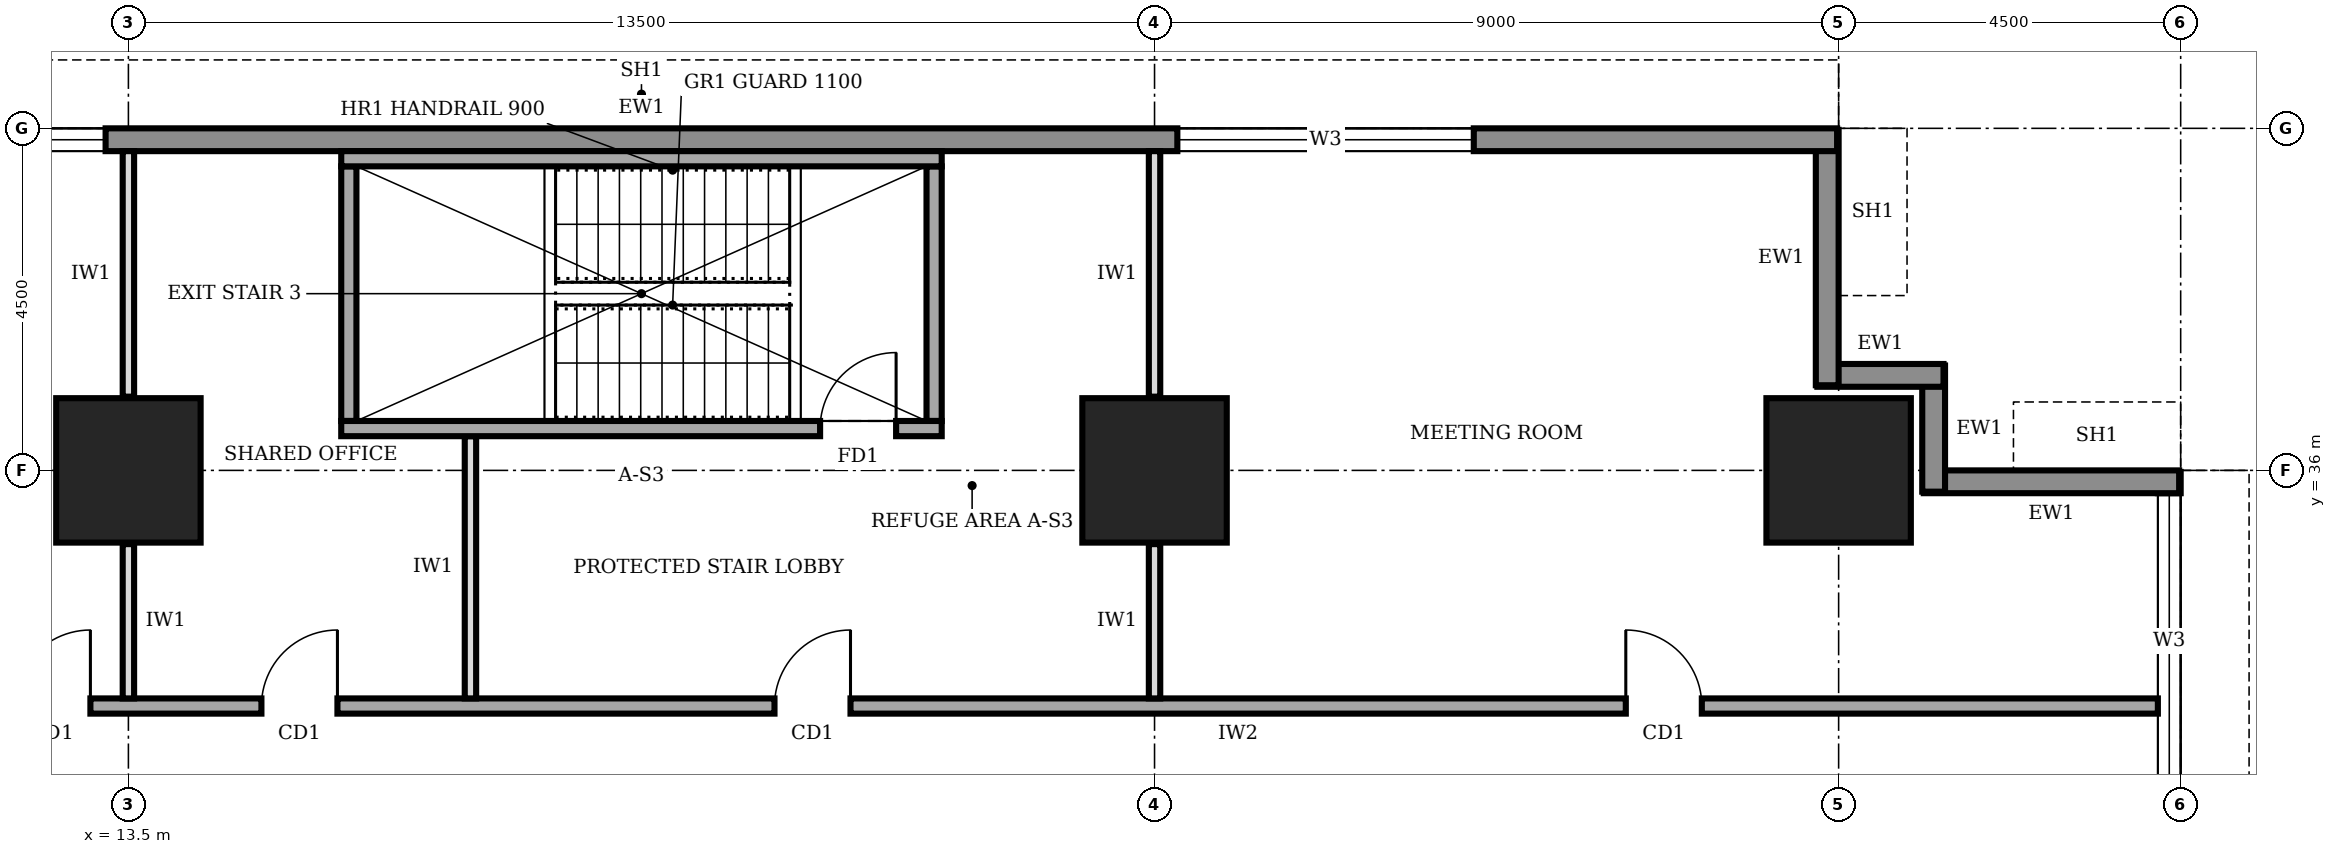
"""IFC4 building model, lengths in metres.
Left out: names, types, materials, properties, quantities, classifications, styles, units other than length and angle.
Written with IfcOpenShell. Run it as: python <this file> out.ifc"""

import sys

from ifc_helpers import new_model, si_unit, direction, frame, frame_2d, origin, origin_2d, place, context, subcontext, project, spatial, rectangle, extrude, element, fill, save


model = new_model("IFC4")
c1 = context("Model", 3, precision=1e-05, world=origin(), true_north=direction((0.0, 1.0)))
c2 = subcontext(c1, "Body", "Model", "MODEL_VIEW")
j1 = project(units=[si_unit("LENGTHUNIT", "METRE"), si_unit("PLANEANGLEUNIT", "RADIAN")], contexts=[c1])
p1 = place(None, origin())
s1 = spatial("IfcSite", under=j1, at=p1, CompositionType="ELEMENT")
p2 = place(p1, origin())
s2 = spatial("IfcBuilding", under=s1, at=p2, CompositionType="ELEMENT")
p3 = place(p2, frame((0.0, 0.0, 93.0)))
s3 = spatial("IfcBuildingStorey", under=s2, at=p3, CompositionType="ELEMENT", Elevation=93.0)
for number, where, z_axis, x_axis in (
    (1, (13.5, 36.0, 0.0), (0.0, 0.0, 1.0), (1.0, 0.0, 0.0)),
    (2, (27.0, 36.0, 0.0), (0.0, 0.0, 1.0), (1.0, 0.0, 0.0)),
    (3, (36.0, 36.0, 0.0), (0.0, 0.0, 1.0), (1.0, 0.0, 0.0)),
):
    element("IfcColumn", number, at=place(p3, frame(where, z_axis=z_axis, x_axis=x_axis)), inside=s3, PredefinedType="COLUMN", context=c2, shape_type="SweptSolid", body=[
        extrude(rectangle(XDim=1.9, YDim=1.9, at=origin_2d()), origin(), (0.0, 0.0, 1.0), 4.0),
    ])
p4 = place(p3, frame((40.35, 4.52, 0.0), z_axis=(0.0, 0.0, 1.0), x_axis=(0.0, 1.0, 0.0)))
e4 = element("IfcWall", 4, at=p4, inside=s3, PredefinedType="STANDARD", context=c2, shape_type="SweptSolid", body=[
    extrude(rectangle(XDim=31.46, YDim=0.3, at=frame_2d((15.73, 0.0))), origin(), (0.0, 0.0, 1.0), 3.75),
])
p5 = place(p4, frame((4.78, 0.0, 0.95)))
e5 = element("IfcOpeningElement", 5, at=p5, cuts=e4, PredefinedType="OPENING", context=c2, shape_type="SweptSolid", body=[
    extrude(rectangle(XDim=3.9, YDim=1.8, at=frame_2d((1.95, 0.9))), frame((0.0, 0.16, 0.0), z_axis=(0.0, -1.0, 0.0), x_axis=(1.0, 0.0, 0.0)), (0.0, 0.0, 1.0), 0.32),
])
p6 = place(p4, frame((9.28, 0.0, 0.95)))
e6 = element("IfcOpeningElement", 6, at=p6, cuts=e4, PredefinedType="OPENING", context=c2, shape_type="SweptSolid", body=[
    extrude(rectangle(XDim=3.9, YDim=1.8, at=frame_2d((1.95, 0.9))), frame((0.0, 0.16, 0.0), z_axis=(0.0, -1.0, 0.0), x_axis=(1.0, 0.0, 0.0)), (0.0, 0.0, 1.0), 0.32),
])
p7 = place(p4, frame((13.78, 0.0, 0.95)))
e7 = element("IfcOpeningElement", 7, at=p7, cuts=e4, PredefinedType="OPENING", context=c2, shape_type="SweptSolid", body=[
    extrude(rectangle(XDim=3.9, YDim=1.8, at=frame_2d((1.95, 0.9))), frame((0.0, 0.16, 0.0), z_axis=(0.0, -1.0, 0.0), x_axis=(1.0, 0.0, 0.0)), (0.0, 0.0, 1.0), 0.32),
])
p8 = place(p4, frame((18.28, 0.0, 0.95)))
e8 = element("IfcOpeningElement", 8, at=p8, cuts=e4, PredefinedType="OPENING", context=c2, shape_type="SweptSolid", body=[
    extrude(rectangle(XDim=3.9, YDim=1.8, at=frame_2d((1.95, 0.9))), frame((0.0, 0.16, 0.0), z_axis=(0.0, -1.0, 0.0), x_axis=(1.0, 0.0, 0.0)), (0.0, 0.0, 1.0), 0.32),
])
p9 = place(p4, frame((22.78, 0.0, 0.95)))
e9 = element("IfcOpeningElement", 9, at=p9, cuts=e4, PredefinedType="OPENING", context=c2, shape_type="SweptSolid", body=[
    extrude(rectangle(XDim=3.9, YDim=1.8, at=frame_2d((1.95, 0.9))), frame((0.0, 0.16, 0.0), z_axis=(0.0, -1.0, 0.0), x_axis=(1.0, 0.0, 0.0)), (0.0, 0.0, 1.0), 0.32),
])
p10 = place(p4, frame((27.28, 0.0, 0.95)))
e10 = element("IfcOpeningElement", 10, at=p10, cuts=e4, PredefinedType="OPENING", context=c2, shape_type="SweptSolid", body=[
    extrude(rectangle(XDim=3.9, YDim=1.8, at=frame_2d((1.95, 0.9))), frame((0.0, 0.16, 0.0), z_axis=(0.0, -1.0, 0.0), x_axis=(1.0, 0.0, 0.0)), (0.0, 0.0, 1.0), 0.32),
])
p11 = place(p3, frame((40.48, 35.85, 0.0), z_axis=(0.0, 0.0, 1.0), x_axis=(-1.0, 0.0, 0.0)))
e11 = element("IfcWall", 11, at=p11, inside=s3, PredefinedType="STANDARD", context=c2, shape_type="SweptSolid", body=[
    extrude(rectangle(XDim=3.36, YDim=0.3, at=frame_2d((1.68, 0.0))), origin(), (0.0, 0.0, 1.0), 2.85),
])
for number, where, z_axis, x_axis in (
    (12, (37.25, 35.72, 0.0), (0.0, 0.0, 1.0), (0.0, 1.0, 0.0)),
    (13, (37.38, 37.25, 0.0), (0.0, 0.0, 1.0), (-1.0, 0.0, 0.0)),
):
    element("IfcWall", number, at=place(p3, frame(where, z_axis=z_axis, x_axis=x_axis)), inside=s3, PredefinedType="STANDARD", context=c2, shape_type="SweptSolid", body=[
        extrude(rectangle(XDim=1.66, YDim=0.3, at=frame_2d((0.83, 0.0))), origin(), (0.0, 0.0, 1.0), 3.75),
    ])
p12 = place(p3, frame((35.85, 37.12, 0.0), z_axis=(0.0, 0.0, 1.0), x_axis=(0.0, 1.0, 0.0)))
e14 = element("IfcWall", 14, at=p12, inside=s3, PredefinedType="STANDARD", context=c2, shape_type="SweptSolid", body=[
    extrude(rectangle(XDim=3.36, YDim=0.3, at=frame_2d((1.68, 0.0))), origin(), (0.0, 0.0, 1.0), 2.85),
])
p13 = place(p3, frame((35.98, 40.35, 0.0), z_axis=(0.0, 0.0, 1.0), x_axis=(-1.0, 0.0, 0.0)))
e15 = element("IfcWall", 15, at=p13, inside=s3, PredefinedType="STANDARD", context=c2, shape_type="SweptSolid", body=[
    extrude(rectangle(XDim=31.46, YDim=0.3, at=frame_2d((15.73, 0.0))), origin(), (0.0, 0.0, 1.0), 3.75),
])
p14 = place(p13, frame((27.28, 0.0, 0.95)))
e16 = element("IfcOpeningElement", 16, at=p14, cuts=e15, PredefinedType="OPENING", context=c2, shape_type="SweptSolid", body=[
    extrude(rectangle(XDim=3.9, YDim=1.8, at=frame_2d((1.95, 0.9))), frame((0.0, 0.16, 0.0), z_axis=(0.0, -1.0, 0.0), x_axis=(1.0, 0.0, 0.0)), (0.0, 0.0, 1.0), 0.32),
])
p15 = place(p13, frame((22.78, 0.0, 0.95)))
e17 = element("IfcOpeningElement", 17, at=p15, cuts=e15, PredefinedType="OPENING", context=c2, shape_type="SweptSolid", body=[
    extrude(rectangle(XDim=3.9, YDim=1.8, at=frame_2d((1.95, 0.9))), frame((0.0, 0.16, 0.0), z_axis=(0.0, -1.0, 0.0), x_axis=(1.0, 0.0, 0.0)), (0.0, 0.0, 1.0), 0.32),
])
p16 = place(p13, frame((4.78, 0.0, 0.95)))
e18 = element("IfcOpeningElement", 18, at=p16, cuts=e15, PredefinedType="OPENING", context=c2, shape_type="SweptSolid", body=[
    extrude(rectangle(XDim=3.9, YDim=1.8, at=frame_2d((1.95, 0.9))), frame((0.0, 0.16, 0.0), z_axis=(0.0, -1.0, 0.0), x_axis=(1.0, 0.0, 0.0)), (0.0, 0.0, 1.0), 0.32),
])
p17 = place(p3, frame((40.2, 32.9, 0.0), z_axis=(0.0, 0.0, 1.0), x_axis=(-1.0, 0.0, 0.0)))
e19 = element("IfcWall", 19, at=p17, inside=s3, PredefinedType="SOLIDWALL", context=c2, shape_type="SweptSolid", body=[
    extrude(rectangle(XDim=28.5, YDim=0.2, at=frame_2d((14.25, 0.0))), origin(), (0.0, 0.0, 1.0), 3.75),
])
p18 = place(p17, frame((27.2, 0.0, 0.0)))
e20 = element("IfcOpeningElement", 20, at=p18, cuts=e19, PredefinedType="OPENING", context=c2, shape_type="SweptSolid", body=[
    extrude(rectangle(XDim=1.0, YDim=2.1, at=frame_2d((0.5, 1.05))), frame((0.0, 0.11, 0.0), z_axis=(0.0, -1.0, 0.0), x_axis=(1.0, 0.0, 0.0)), (0.0, 0.0, 1.0), 0.22),
])
p19 = place(p17, frame((23.95, 0.0, 0.0)))
e21 = element("IfcOpeningElement", 21, at=p19, cuts=e19, PredefinedType="OPENING", context=c2, shape_type="SweptSolid", body=[
    extrude(rectangle(XDim=1.0, YDim=2.1, at=frame_2d((0.5, 1.05))), frame((0.0, 0.11, 0.0), z_axis=(0.0, -1.0, 0.0), x_axis=(1.0, 0.0, 0.0)), (0.0, 0.0, 1.0), 0.22),
])
p20 = place(p17, frame((17.2, 0.0, 0.0)))
e22 = element("IfcOpeningElement", 22, at=p20, cuts=e19, PredefinedType="OPENING", context=c2, shape_type="SweptSolid", body=[
    extrude(rectangle(XDim=1.0, YDim=2.1, at=frame_2d((0.5, 1.05))), frame((0.0, 0.11, 0.0), z_axis=(0.0, -1.0, 0.0), x_axis=(1.0, 0.0, 0.0)), (0.0, 0.0, 1.0), 0.22),
])
p21 = place(p17, frame((6.0, 0.0, 0.0)))
e23 = element("IfcOpeningElement", 23, at=p21, cuts=e19, PredefinedType="OPENING", context=c2, shape_type="SweptSolid", body=[
    extrude(rectangle(XDim=1.0, YDim=2.1, at=frame_2d((0.5, 1.05))), frame((0.0, 0.11, 0.0), z_axis=(0.0, -1.0, 0.0), x_axis=(1.0, 0.0, 0.0)), (0.0, 0.0, 1.0), 0.22),
])
p22 = place(p3, frame((13.5, 33.0, 0.0), z_axis=(0.0, 0.0, 1.0), x_axis=(0.0, 1.0, 0.0)))
e24 = element("IfcWall", 24, at=p22, inside=s3, PredefinedType="PARTITIONING", context=c2, shape_type="SweptSolid", body=[
    extrude(rectangle(XDim=2.03, YDim=0.15, at=frame_2d((1.015, 0.0))), origin(), (0.0, 0.0, 1.0), 2.85),
])
p23 = place(p3, frame((13.5, 36.97, 0.0), z_axis=(0.0, 0.0, 1.0), x_axis=(0.0, 1.0, 0.0)))
e25 = element("IfcWall", 25, at=p23, inside=s3, PredefinedType="PARTITIONING", context=c2, shape_type="SweptSolid", body=[
    extrude(rectangle(XDim=3.23, YDim=0.15, at=frame_2d((1.615, 0.0))), origin(), (0.0, 0.0, 1.0), 2.85),
])
p24 = place(p3, frame((18.0, 33.0, 0.0), z_axis=(0.0, 0.0, 1.0), x_axis=(0.0, 1.0, 0.0)))
e26 = element("IfcWall", 26, at=p24, inside=s3, PredefinedType="PARTITIONING", context=c2, shape_type="SweptSolid", body=[
    extrude(rectangle(XDim=3.45, YDim=0.15, at=frame_2d((1.725, 0.0))), origin(), (0.0, 0.0, 1.0), 3.75),
])
p25 = place(p3, frame((27.0, 33.0, 0.0), z_axis=(0.0, 0.0, 1.0), x_axis=(0.0, 1.0, 0.0)))
e27 = element("IfcWall", 27, at=p25, inside=s3, PredefinedType="PARTITIONING", context=c2, shape_type="SweptSolid", body=[
    extrude(rectangle(XDim=2.03, YDim=0.15, at=frame_2d((1.015, 0.0))), origin(), (0.0, 0.0, 1.0), 2.85),
])
p26 = place(p3, frame((27.0, 36.97, 0.0), z_axis=(0.0, 0.0, 1.0), x_axis=(0.0, 1.0, 0.0)))
e28 = element("IfcWall", 28, at=p26, inside=s3, PredefinedType="PARTITIONING", context=c2, shape_type="SweptSolid", body=[
    extrude(rectangle(XDim=3.23, YDim=0.15, at=frame_2d((1.615, 0.0))), origin(), (0.0, 0.0, 1.0), 2.85),
])
p27 = place(p3, frame((16.3, 36.55, 0.0), z_axis=(0.0, 0.0, 1.0), x_axis=(1.0, 0.0, 0.0)))
e29 = element("IfcWall", 29, at=p27, inside=s3, PredefinedType="SOLIDWALL", context=c2, shape_type="SweptSolid", body=[
    extrude(rectangle(XDim=7.9, YDim=0.2, at=frame_2d((3.95, 0.0))), origin(), (0.0, 0.0, 1.0), 3.75),
])
p28 = place(p27, frame((6.3, 0.0, 0.0)))
e30 = element("IfcOpeningElement", 30, at=p28, cuts=e29, PredefinedType="OPENING", context=c2, shape_type="SweptSolid", body=[
    extrude(rectangle(XDim=1.0, YDim=2.1, at=frame_2d((0.5, 1.05))), frame((0.0, 0.11, 0.0), z_axis=(0.0, -1.0, 0.0), x_axis=(1.0, 0.0, 0.0)), (0.0, 0.0, 1.0), 0.22),
])
p29 = place(p3, frame((16.3, 40.1, 0.0), z_axis=(0.0, 0.0, 1.0), x_axis=(1.0, 0.0, 0.0)))
e31 = element("IfcWall", 31, at=p29, inside=s3, PredefinedType="SOLIDWALL", context=c2, shape_type="SweptSolid", body=[
    extrude(rectangle(XDim=7.9, YDim=0.2, at=frame_2d((3.95, 0.0))), origin(), (0.0, 0.0, 1.0), 3.75),
])
for number, where, z_axis, x_axis in (
    (32, (16.4, 36.65, 0.0), (0.0, 0.0, 1.0), (0.0, 1.0, 0.0)),
    (33, (24.1, 36.65, 0.0), (0.0, 0.0, 1.0), (0.0, 1.0, 0.0)),
):
    element("IfcWall", number, at=place(p3, frame(where, z_axis=z_axis, x_axis=x_axis)), inside=s3, PredefinedType="SOLIDWALL", context=c2, shape_type="SweptSolid", body=[
        extrude(rectangle(XDim=3.35, YDim=0.2, at=frame_2d((1.675, 0.0))), origin(), (0.0, 0.0, 1.0), 3.75),
    ])
p30 = place(p10, origin())
e34 = element("IfcWindow", 34, at=p30, inside=s3, PartitioningType="SINGLE_PANEL", PredefinedType="WINDOW", context=c2, shape_type="SweptSolid", body=[
    extrude(rectangle(XDim=3.9, YDim=1.8, at=frame_2d((1.95, 0.9))), frame((0.0, 0.03, 0.0), z_axis=(0.0, -1.0, 0.0), x_axis=(1.0, 0.0, 0.0)), (0.0, 0.0, 1.0), 0.06),
])
fill(e10, e34)
p31 = place(p15, origin())
e35 = element("IfcWindow", 35, at=p31, inside=s3, PartitioningType="SINGLE_PANEL", PredefinedType="WINDOW", context=c2, shape_type="SweptSolid", body=[
    extrude(rectangle(XDim=3.9, YDim=1.8, at=frame_2d((1.95, 0.9))), frame((0.0, 0.03, 0.0), z_axis=(0.0, -1.0, 0.0), x_axis=(1.0, 0.0, 0.0)), (0.0, 0.0, 1.0), 0.06),
])
fill(e17, e35)
p32 = place(p16, origin())
e36 = element("IfcWindow", 36, at=p32, inside=s3, PartitioningType="SINGLE_PANEL", PredefinedType="WINDOW", context=c2, shape_type="SweptSolid", body=[
    extrude(rectangle(XDim=3.9, YDim=1.8, at=frame_2d((1.95, 0.9))), frame((0.0, 0.03, 0.0), z_axis=(0.0, -1.0, 0.0), x_axis=(1.0, 0.0, 0.0)), (0.0, 0.0, 1.0), 0.06),
])
fill(e18, e36)
p33 = place(p18, frame((1.0, 0.0, 0.0), z_axis=(0.0, 0.0, 1.0), x_axis=(-1.0, 0.0, 0.0)))
e37 = element("IfcDoor", 37, at=p33, inside=s3, OperationType="SINGLE_SWING_RIGHT", PredefinedType="DOOR", context=c2, shape_type="SweptSolid", body=[
    extrude(rectangle(XDim=1.0, YDim=2.1, at=frame_2d((0.5, 1.05))), frame((0.0, 0.025, 0.0), z_axis=(0.0, -1.0, 0.0), x_axis=(1.0, 0.0, 0.0)), (0.0, 0.0, 1.0), 0.05),
])
fill(e20, e37)
p34 = place(p19, frame((1.0, 0.0, 0.0), z_axis=(0.0, 0.0, 1.0), x_axis=(-1.0, 0.0, 0.0)))
e38 = element("IfcDoor", 38, at=p34, inside=s3, OperationType="SINGLE_SWING_RIGHT", PredefinedType="DOOR", context=c2, shape_type="SweptSolid", body=[
    extrude(rectangle(XDim=1.0, YDim=2.1, at=frame_2d((0.5, 1.05))), frame((0.0, 0.025, 0.0), z_axis=(0.0, -1.0, 0.0), x_axis=(1.0, 0.0, 0.0)), (0.0, 0.0, 1.0), 0.05),
])
fill(e21, e38)
p35 = place(p20, frame((1.0, 0.0, 0.0), z_axis=(0.0, 0.0, 1.0), x_axis=(-1.0, 0.0, 0.0)))
e39 = element("IfcDoor", 39, at=p35, inside=s3, OperationType="SINGLE_SWING_RIGHT", PredefinedType="DOOR", context=c2, shape_type="SweptSolid", body=[
    extrude(rectangle(XDim=1.0, YDim=2.1, at=frame_2d((0.5, 1.05))), frame((0.0, 0.025, 0.0), z_axis=(0.0, -1.0, 0.0), x_axis=(1.0, 0.0, 0.0)), (0.0, 0.0, 1.0), 0.05),
])
fill(e22, e39)
p36 = place(p21, frame((1.0, 0.0, 0.0), z_axis=(0.0, 0.0, 1.0), x_axis=(-1.0, 0.0, 0.0)))
e40 = element("IfcDoor", 40, at=p36, inside=s3, OperationType="SINGLE_SWING_LEFT", PredefinedType="DOOR", context=c2, shape_type="SweptSolid", body=[
    extrude(rectangle(XDim=1.0, YDim=2.1, at=frame_2d((0.5, 1.05))), frame((0.0, 0.025, 0.0), z_axis=(0.0, -1.0, 0.0), x_axis=(1.0, 0.0, 0.0)), (0.0, 0.0, 1.0), 0.05),
])
fill(e23, e40)
p37 = place(p28, origin())
e41 = element("IfcDoor", 41, at=p37, inside=s3, OperationType="SINGLE_SWING_RIGHT", PredefinedType="DOOR", context=c2, shape_type="SweptSolid", body=[
    extrude(rectangle(XDim=1.0, YDim=2.1, at=frame_2d((0.5, 1.05))), frame((0.0, 0.025, 0.0), z_axis=(0.0, -1.0, 0.0), x_axis=(1.0, 0.0, 0.0)), (0.0, 0.0, 1.0), 0.05),
])
fill(e30, e41)
save(model, sys.argv[1])
